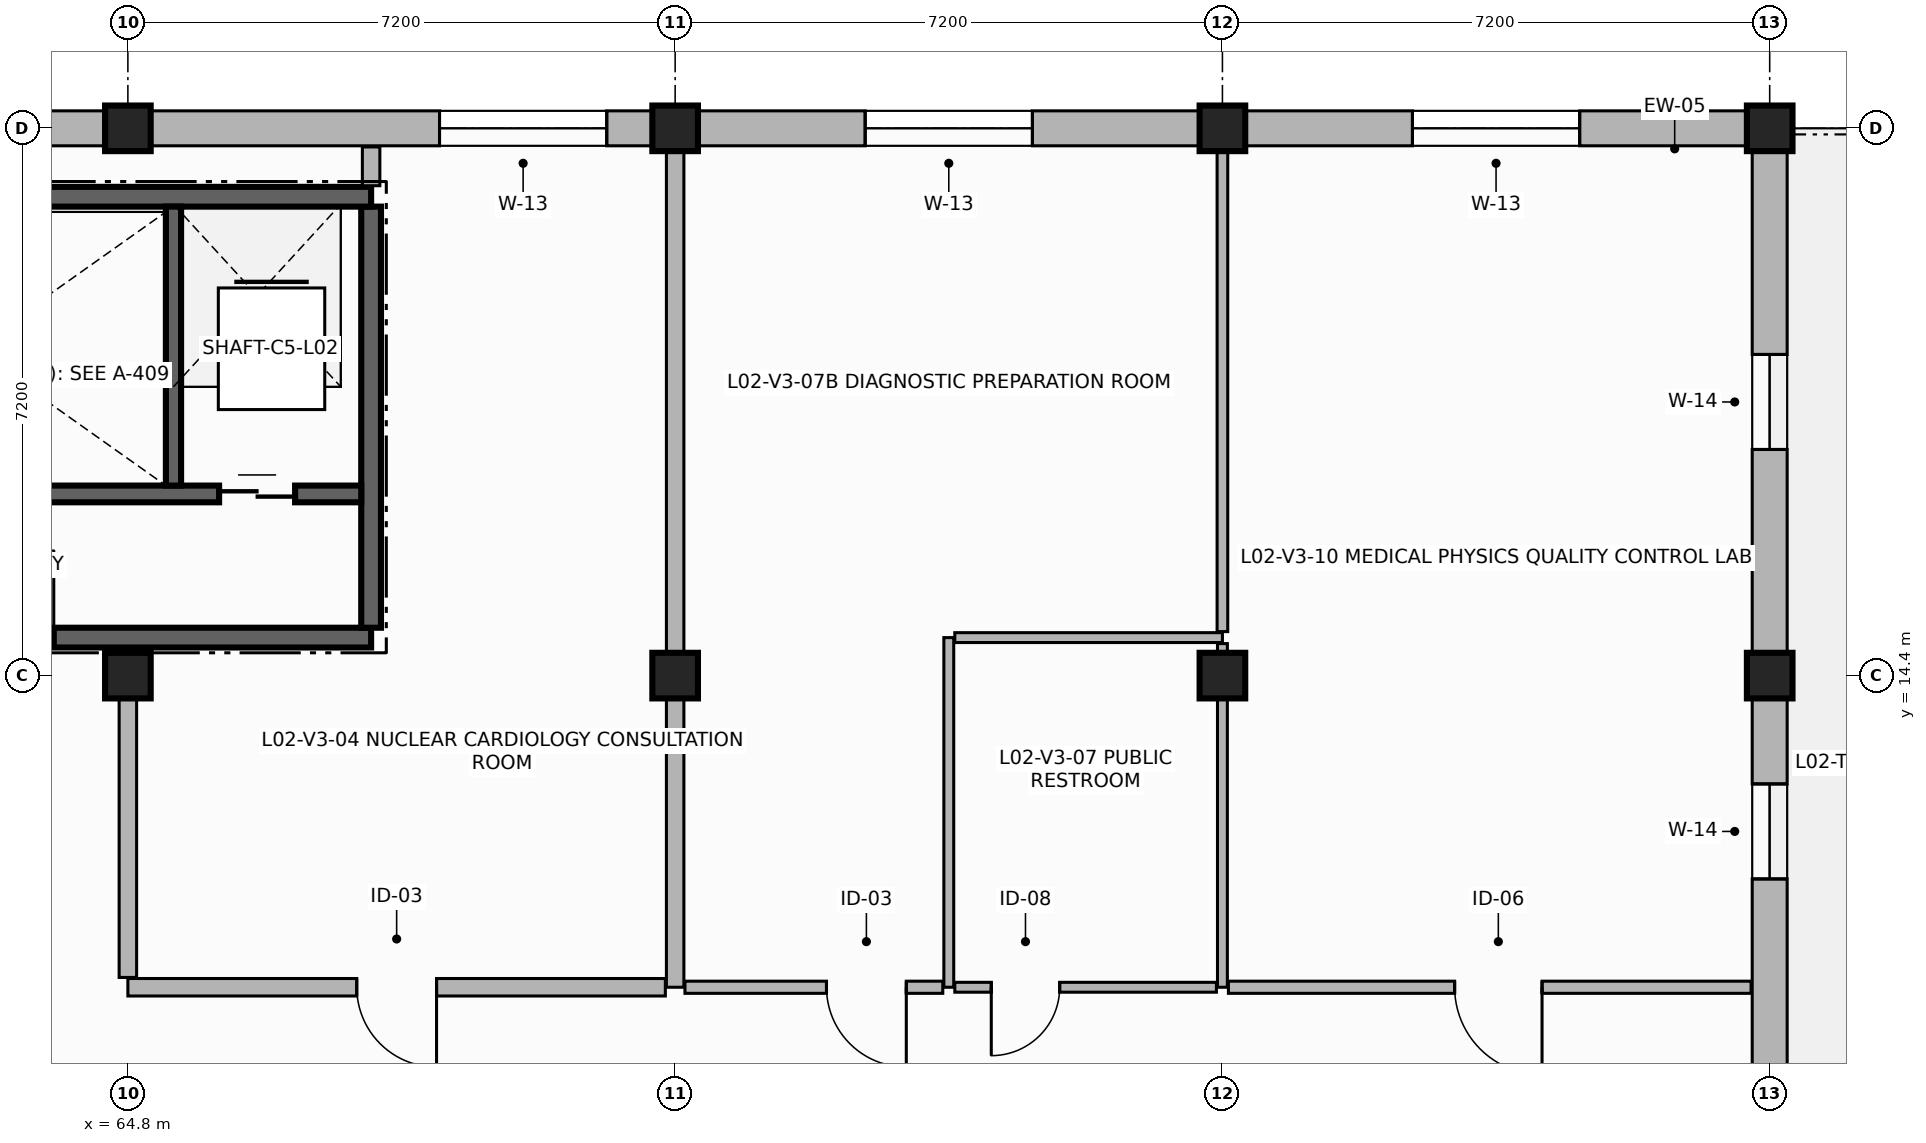
"""IFC4 building model, lengths in metres.
Left out: names, types, materials, properties, quantities, classifications, styles, units other than length and angle.
Written with IfcOpenShell. Run it as: python <this file> out.ifc"""

import sys

from ifc_helpers import new_model, si_unit, direction, frame, frame_2d, origin, origin_2d, place, context, subcontext, project, spatial, rectangle, extrude, element, fill, save


model = new_model("IFC4")
c1 = context("Model", 3, precision=1e-05, world=origin(), true_north=direction((0.0, 1.0)))
c2 = subcontext(c1, "Body", "Model", "MODEL_VIEW")
j1 = project(units=[si_unit("LENGTHUNIT", "METRE"), si_unit("PLANEANGLEUNIT", "RADIAN")], contexts=[c1])
p1 = place(None, origin())
s1 = spatial("IfcSite", under=j1, at=p1, CompositionType="ELEMENT")
p2 = place(p1, origin())
s2 = spatial("IfcBuilding", under=s1, at=p2, CompositionType="ELEMENT")
p3 = place(p2, frame((0.0, 0.0, 8.4)))
s3 = spatial("IfcBuildingStorey", under=s2, at=p3, CompositionType="ELEMENT", Elevation=8.4)
for number, where, z_axis, x_axis in (
    (1, (64.8, 14.4, 0.0), (0.0, 0.0, 1.0), (1.0, 0.0, 0.0)),
    (2, (64.8, 21.6, 0.0), (0.0, 0.0, 1.0), (1.0, 0.0, 0.0)),
    (3, (72.0, 14.4, 0.0), (0.0, 0.0, 1.0), (1.0, 0.0, 0.0)),
    (4, (72.0, 21.6, 0.0), (0.0, 0.0, 1.0), (1.0, 0.0, 0.0)),
    (5, (79.2, 14.4, 0.0), (0.0, 0.0, 1.0), (1.0, 0.0, 0.0)),
    (6, (79.2, 21.6, 0.0), (0.0, 0.0, 1.0), (1.0, 0.0, 0.0)),
    (7, (86.4, 14.4, 0.0), (0.0, 0.0, 1.0), (1.0, 0.0, 0.0)),
    (8, (86.4, 21.6, 0.0), (0.0, 0.0, 1.0), (1.0, 0.0, 0.0)),
):
    element("IfcColumn", number, at=place(p3, frame(where, z_axis=z_axis, x_axis=x_axis)), inside=s3, PredefinedType="COLUMN", context=c2, shape_type="SweptSolid", body=[
        extrude(rectangle(XDim=0.6, YDim=0.6, at=origin_2d()), origin(), (0.0, 0.0, 1.0), 3.9),
    ])
p4 = place(p3, frame((86.4, 7.2, 0.0), z_axis=(0.0, 0.0, 1.0), x_axis=(0.0, 1.0, 0.0)))
e9 = element("IfcWall", 9, at=p4, inside=s3, PredefinedType="SOLIDWALL", context=c2, shape_type="SweptSolid", body=[
    extrude(rectangle(XDim=7.2, YDim=0.46, at=frame_2d((3.6, 0.0))), origin(), (0.0, 0.0, 1.0), 3.3),
])
p5 = place(p4, frame((4.525, 0.0, 1.2)))
e10 = element("IfcOpeningElement", 10, at=p5, cuts=e9, PredefinedType="OPENING", context=c2, shape_type="SweptSolid", body=[
    extrude(rectangle(XDim=1.25, YDim=1.35, at=frame_2d((0.625, 0.675))), frame((0.0, 0.24, 0.0), z_axis=(0.0, -1.0, 0.0), x_axis=(1.0, 0.0, 0.0)), (0.0, 0.0, 1.0), 0.48),
])
p6 = place(p3, frame((86.4, 14.4, 0.0), z_axis=(0.0, 0.0, 1.0), x_axis=(0.0, 1.0, 0.0)))
e11 = element("IfcWall", 11, at=p6, inside=s3, PredefinedType="SOLIDWALL", context=c2, shape_type="SweptSolid", body=[
    extrude(rectangle(XDim=7.2, YDim=0.46, at=frame_2d((3.6, 0.0))), origin(), (0.0, 0.0, 1.0), 3.3),
])
p7 = place(p6, frame((2.975, 0.0, 1.2)))
e12 = element("IfcOpeningElement", 12, at=p7, cuts=e11, PredefinedType="OPENING", context=c2, shape_type="SweptSolid", body=[
    extrude(rectangle(XDim=1.25, YDim=1.35, at=frame_2d((0.625, 0.675))), frame((0.0, 0.24, 0.0), z_axis=(0.0, -1.0, 0.0), x_axis=(1.0, 0.0, 0.0)), (0.0, 0.0, 1.0), 0.48),
])
p8 = place(p3, frame((86.4, 21.6, 0.0), z_axis=(0.0, 0.0, 1.0), x_axis=(-1.0, 0.0, 0.0)))
e13 = element("IfcWall", 13, at=p8, inside=s3, PredefinedType="SOLIDWALL", context=c2, shape_type="SweptSolid", body=[
    extrude(rectangle(XDim=7.2, YDim=0.46, at=frame_2d((3.6, 0.0))), origin(), (0.0, 0.0, 1.0), 3.3),
])
p9 = place(p8, frame((2.5, 0.0, 1.2)))
e14 = element("IfcOpeningElement", 14, at=p9, cuts=e13, PredefinedType="OPENING", context=c2, shape_type="SweptSolid", body=[
    extrude(rectangle(XDim=2.2, YDim=1.1, at=frame_2d((1.1, 0.55))), frame((0.0, 0.24, 0.0), z_axis=(0.0, -1.0, 0.0), x_axis=(1.0, 0.0, 0.0)), (0.0, 0.0, 1.0), 0.48),
])
p10 = place(p3, frame((79.2, 21.6, 0.0), z_axis=(0.0, 0.0, 1.0), x_axis=(-1.0, 0.0, 0.0)))
e15 = element("IfcWall", 15, at=p10, inside=s3, PredefinedType="SOLIDWALL", context=c2, shape_type="SweptSolid", body=[
    extrude(rectangle(XDim=7.2, YDim=0.46, at=frame_2d((3.6, 0.0))), origin(), (0.0, 0.0, 1.0), 3.3),
])
p11 = place(p10, frame((2.5, 0.0, 1.2)))
e16 = element("IfcOpeningElement", 16, at=p11, cuts=e15, PredefinedType="OPENING", context=c2, shape_type="SweptSolid", body=[
    extrude(rectangle(XDim=2.2, YDim=1.1, at=frame_2d((1.1, 0.55))), frame((0.0, 0.24, 0.0), z_axis=(0.0, -1.0, 0.0), x_axis=(1.0, 0.0, 0.0)), (0.0, 0.0, 1.0), 0.48),
])
p12 = place(p3, frame((72.0, 21.6, 0.0), z_axis=(0.0, 0.0, 1.0), x_axis=(-1.0, 0.0, 0.0)))
e17 = element("IfcWall", 17, at=p12, inside=s3, PredefinedType="SOLIDWALL", context=c2, shape_type="SweptSolid", body=[
    extrude(rectangle(XDim=7.2, YDim=0.46, at=frame_2d((3.6, 0.0))), origin(), (0.0, 0.0, 1.0), 3.3),
])
p13 = place(p12, frame((0.9, 0.0, 1.2)))
e18 = element("IfcOpeningElement", 18, at=p13, cuts=e17, PredefinedType="OPENING", context=c2, shape_type="SweptSolid", body=[
    extrude(rectangle(XDim=2.2, YDim=1.1, at=frame_2d((1.1, 0.55))), frame((0.0, 0.24, 0.0), z_axis=(0.0, -1.0, 0.0), x_axis=(1.0, 0.0, 0.0)), (0.0, 0.0, 1.0), 0.48),
])
p14 = place(p3, frame((64.8, 21.6, 0.0), z_axis=(0.0, 0.0, 1.0), x_axis=(-1.0, 0.0, 0.0)))
e19 = element("IfcWall", 19, at=p14, inside=s3, PredefinedType="SOLIDWALL", context=c2, shape_type="SweptSolid", body=[
    extrude(rectangle(XDim=7.2, YDim=0.46, at=frame_2d((3.6, 0.0))), origin(), (0.0, 0.0, 1.0), 3.3),
])
p15 = place(p14, frame((2.5, 0.0, 1.2)))
e20 = element("IfcOpeningElement", 20, at=p15, cuts=e19, PredefinedType="OPENING", context=c2, shape_type="SweptSolid", body=[
    extrude(rectangle(XDim=2.2, YDim=1.1, at=frame_2d((1.1, 0.55))), frame((0.0, 0.24, 0.0), z_axis=(0.0, -1.0, 0.0), x_axis=(1.0, 0.0, 0.0)), (0.0, 0.0, 1.0), 0.48),
])
p16 = place(p3, frame((58.5, 14.9, 0.0), z_axis=(0.0, 0.0, 1.0), x_axis=(1.0, 0.0, 0.0)))
e21 = element("IfcWall", 21, at=p16, inside=s3, PredefinedType="SHEAR", context=c2, shape_type="SweptSolid", body=[
    extrude(rectangle(XDim=9.5, YDim=0.26, at=frame_2d((4.75, 0.0))), origin(), (0.0, 0.0, 1.0), 3.72),
])
p17 = place(p16, frame((4.175, 0.0, 0.0)))
e22 = element("IfcOpeningElement", 22, at=p17, cuts=e21, PredefinedType="OPENING", context=c2, shape_type="SweptSolid", body=[
    extrude(rectangle(XDim=1.15, YDim=2.2, at=frame_2d((0.575, 1.1))), frame((0.0, 0.14, 0.0), z_axis=(0.0, -1.0, 0.0), x_axis=(1.0, 0.0, 0.0)), (0.0, 0.0, 1.0), 0.28),
])
p18 = place(p3, frame((68.0, 15.03, 0.0), z_axis=(0.0, 0.0, 1.0), x_axis=(0.0, 1.0, 0.0)))
e23 = element("IfcWall", 23, at=p18, inside=s3, PredefinedType="SHEAR", context=c2, shape_type="SweptSolid", body=[
    extrude(rectangle(XDim=5.54, YDim=0.26, at=frame_2d((2.77, 0.0))), origin(), (0.0, 0.0, 1.0), 3.72),
])
p19 = place(p3, frame((68.0, 20.7, 0.0), z_axis=(0.0, 0.0, 1.0), x_axis=(-1.0, 0.0, 0.0)))
e24 = element("IfcWall", 24, at=p19, inside=s3, PredefinedType="SHEAR", context=c2, shape_type="SweptSolid", body=[
    extrude(rectangle(XDim=9.5, YDim=0.26, at=frame_2d((4.75, 0.0))), origin(), (0.0, 0.0, 1.0), 3.72),
])
p20 = place(p3, frame((58.63, 16.79, 0.0), z_axis=(0.0, 0.0, 1.0), x_axis=(1.0, 0.0, 0.0)))
e25 = element("IfcWall", 25, at=p20, inside=s3, PredefinedType="SHEAR", context=c2, shape_type="SweptSolid", body=[
    extrude(rectangle(XDim=9.24, YDim=0.22, at=frame_2d((4.62, 0.0))), origin(), (0.0, 0.0, 1.0), 3.72),
])
p21 = place(p20, frame((0.32, 0.0, 0.0)))
e26 = element("IfcOpeningElement", 26, at=p21, cuts=e25, PredefinedType="OPENING", context=c2, shape_type="SweptSolid", body=[
    extrude(rectangle(XDim=1.1, YDim=2.15, at=frame_2d((0.55, 1.075))), frame((0.0, 0.12, 0.0), z_axis=(0.0, -1.0, 0.0), x_axis=(1.0, 0.0, 0.0)), (0.0, 0.0, 1.0), 0.24),
])
p22 = place(p20, frame((7.37, 0.0, 0.0)))
e27 = element("IfcOpeningElement", 27, at=p22, cuts=e25, PredefinedType="OPENING", context=c2, shape_type="SweptSolid", body=[
    extrude(rectangle(XDim=1.0, YDim=2.2, at=frame_2d((0.5, 1.1))), frame((0.0, 0.12, 0.0), z_axis=(0.0, -1.0, 0.0), x_axis=(1.0, 0.0, 0.0)), (0.0, 0.0, 1.0), 0.24),
])
p23 = place(p3, frame((65.4, 16.9, 0.0), z_axis=(0.0, 0.0, 1.0), x_axis=(0.0, 1.0, 0.0)))
e28 = element("IfcWall", 28, at=p23, inside=s3, PredefinedType="SHEAR", context=c2, shape_type="SweptSolid", body=[
    extrude(rectangle(XDim=3.67, YDim=0.2, at=frame_2d((1.835, 0.0))), origin(), (0.0, 0.0, 1.0), 3.72),
])
p24 = place(p3, frame((72.0, 21.355, 0.0), z_axis=(0.0, 0.0, 1.0), x_axis=(0.0, -1.0, 0.0)))
e29 = element("IfcWall", 29, at=p24, inside=s3, PredefinedType="PARTITIONING", context=c2, shape_type="SweptSolid", body=[
    extrude(rectangle(XDim=11.055, YDim=0.23, at=frame_2d((5.527, 0.0))), origin(), (0.0, 0.0, 1.0), 3.04),
])
p25 = place(p3, frame((71.871, 10.3, 0.0), z_axis=(0.0, 0.0, 1.0), x_axis=(-1.0, 0.0, 0.0)))
e30 = element("IfcWall", 30, at=p25, inside=s3, PredefinedType="PARTITIONING", context=c2, shape_type="SweptSolid", body=[
    extrude(rectangle(XDim=7.071, YDim=0.23, at=frame_2d((3.536, 0.0))), origin(), (0.0, 0.0, 1.0), 3.04),
])
p26 = place(p25, frame((3.01, 0.0, 0.0)))
e31 = element("IfcOpeningElement", 31, at=p26, cuts=e30, PredefinedType="OPENING", context=c2, shape_type="SweptSolid", body=[
    extrude(rectangle(XDim=1.05, YDim=2.15, at=frame_2d((0.525, 1.075))), frame((0.0, 0.125, 0.0), z_axis=(0.0, -1.0, 0.0), x_axis=(1.0, 0.0, 0.0)), (0.0, 0.0, 1.0), 0.25),
])
p27 = place(p3, frame((64.8, 10.429, 0.0), z_axis=(0.0, 0.0, 1.0), x_axis=(0.0, 1.0, 0.0)))
e32 = element("IfcWall", 32, at=p27, inside=s3, PredefinedType="PARTITIONING", context=c2, shape_type="SweptSolid", body=[
    extrude(rectangle(XDim=4.326, YDim=0.23, at=frame_2d((2.163, 0.0))), origin(), (0.0, 0.0, 1.0), 3.04),
])
p28 = place(p3, frame((68.0, 20.845, 0.0), z_axis=(0.0, 0.0, 1.0), x_axis=(0.0, 1.0, 0.0)))
e33 = element("IfcWall", 33, at=p28, inside=s3, PredefinedType="PARTITIONING", context=c2, shape_type="SweptSolid", body=[
    extrude(rectangle(XDim=0.51, YDim=0.23, at=frame_2d((0.255, 0.0))), origin(), (0.0, 0.0, 1.0), 3.04),
])
p29 = place(p3, frame((75.6, 10.3, 0.0), z_axis=(0.0, 0.0, 1.0), x_axis=(0.0, 1.0, 0.0)))
e34 = element("IfcWall", 34, at=p29, inside=s3, PredefinedType="PARTITIONING", context=c2, shape_type="SweptSolid", body=[
    extrude(rectangle(XDim=4.6, YDim=0.13, at=frame_2d((2.3, 0.0))), origin(), (0.0, 0.0, 1.0), 3.04),
])
p30 = place(p3, frame((75.679, 14.9, 0.0), z_axis=(0.0, 0.0, 1.0), x_axis=(1.0, 0.0, 0.0)))
e35 = element("IfcWall", 35, at=p30, inside=s3, PredefinedType="PARTITIONING", context=c2, shape_type="SweptSolid", body=[
    extrude(rectangle(XDim=3.521, YDim=0.13, at=frame_2d((1.76, 0.0))), origin(), (0.0, 0.0, 1.0), 3.04),
])
p31 = place(p3, frame((79.2, 14.821, 0.0), z_axis=(0.0, 0.0, 1.0), x_axis=(0.0, -1.0, 0.0)))
e36 = element("IfcWall", 36, at=p31, inside=s3, PredefinedType="PARTITIONING", context=c2, shape_type="SweptSolid", body=[
    extrude(rectangle(XDim=4.521, YDim=0.13, at=frame_2d((2.26, 0.0))), origin(), (0.0, 0.0, 1.0), 3.04),
])
p32 = place(p3, frame((79.121, 10.3, 0.0), z_axis=(0.0, 0.0, 1.0), x_axis=(-1.0, 0.0, 0.0)))
e37 = element("IfcWall", 37, at=p32, inside=s3, PredefinedType="PARTITIONING", context=c2, shape_type="SweptSolid", body=[
    extrude(rectangle(XDim=3.442, YDim=0.13, at=frame_2d((1.721, 0.0))), origin(), (0.0, 0.0, 1.0), 3.04),
])
p33 = place(p32, frame((2.062, 0.0, 0.0)))
e38 = element("IfcOpeningElement", 38, at=p33, cuts=e37, PredefinedType="OPENING", context=c2, shape_type="SweptSolid", body=[
    extrude(rectangle(XDim=0.9, YDim=2.1, at=frame_2d((0.45, 1.05))), frame((0.0, 0.075, 0.0), z_axis=(0.0, -1.0, 0.0), x_axis=(1.0, 0.0, 0.0)), (0.0, 0.0, 1.0), 0.15),
])
p34 = place(p3, frame((75.521, 10.3, 0.0), z_axis=(0.0, 0.0, 1.0), x_axis=(-1.0, 0.0, 0.0)))
e39 = element("IfcWall", 39, at=p34, inside=s3, PredefinedType="PARTITIONING", context=c2, shape_type="SweptSolid", body=[
    extrude(rectangle(XDim=3.392, YDim=0.16, at=frame_2d((1.696, 0.0))), origin(), (0.0, 0.0, 1.0), 3.04),
])
p35 = place(p34, frame((0.48, 0.0, 0.0)))
e40 = element("IfcOpeningElement", 40, at=p35, cuts=e39, PredefinedType="OPENING", context=c2, shape_type="SweptSolid", body=[
    extrude(rectangle(XDim=1.05, YDim=2.15, at=frame_2d((0.525, 1.075))), frame((0.0, 0.09, 0.0), z_axis=(0.0, -1.0, 0.0), x_axis=(1.0, 0.0, 0.0)), (0.0, 0.0, 1.0), 0.18),
])
p36 = place(p3, frame((79.2, 21.355, 0.0), z_axis=(0.0, 0.0, 1.0), x_axis=(0.0, -1.0, 0.0)))
e41 = element("IfcWall", 41, at=p36, inside=s3, PredefinedType="PARTITIONING", context=c2, shape_type="SweptSolid", body=[
    extrude(rectangle(XDim=6.376, YDim=0.14, at=frame_2d((3.188, 0.0))), origin(), (0.0, 0.0, 1.0), 3.04),
])
p37 = place(p3, frame((86.155, 10.3, 0.0), z_axis=(0.0, 0.0, 1.0), x_axis=(-1.0, 0.0, 0.0)))
e42 = element("IfcWall", 42, at=p37, inside=s3, PredefinedType="PARTITIONING", context=c2, shape_type="SweptSolid", body=[
    extrude(rectangle(XDim=6.876, YDim=0.16, at=frame_2d((3.438, 0.0))), origin(), (0.0, 0.0, 1.0), 3.04),
])
p38 = place(p37, frame((2.75, 0.0, 0.0)))
e43 = element("IfcOpeningElement", 43, at=p38, cuts=e42, PredefinedType="OPENING", context=c2, shape_type="SweptSolid", body=[
    extrude(rectangle(XDim=1.15, YDim=2.25, at=frame_2d((0.575, 1.125))), frame((0.0, 0.09, 0.0), z_axis=(0.0, -1.0, 0.0), x_axis=(1.0, 0.0, 0.0)), (0.0, 0.0, 1.0), 0.18),
])
p39 = place(p5, origin())
e44 = element("IfcWindow", 44, at=p39, inside=s3, PartitioningType="SINGLE_PANEL", PredefinedType="WINDOW", context=c2, shape_type="SweptSolid", body=[
    extrude(rectangle(XDim=1.25, YDim=1.35, at=frame_2d((0.625, 0.675))), frame((0.0, 0.03, 0.0), z_axis=(0.0, -1.0, 0.0), x_axis=(1.0, 0.0, 0.0)), (0.0, 0.0, 1.0), 0.06),
])
fill(e10, e44)
p40 = place(p7, origin())
e45 = element("IfcWindow", 45, at=p40, inside=s3, PartitioningType="SINGLE_PANEL", PredefinedType="WINDOW", context=c2, shape_type="SweptSolid", body=[
    extrude(rectangle(XDim=1.25, YDim=1.35, at=frame_2d((0.625, 0.675))), frame((0.0, 0.03, 0.0), z_axis=(0.0, -1.0, 0.0), x_axis=(1.0, 0.0, 0.0)), (0.0, 0.0, 1.0), 0.06),
])
fill(e12, e45)
p41 = place(p9, origin())
e46 = element("IfcWindow", 46, at=p41, inside=s3, PartitioningType="SINGLE_PANEL", PredefinedType="WINDOW", context=c2, shape_type="SweptSolid", body=[
    extrude(rectangle(XDim=2.2, YDim=1.1, at=frame_2d((1.1, 0.55))), frame((0.0, 0.03, 0.0), z_axis=(0.0, -1.0, 0.0), x_axis=(1.0, 0.0, 0.0)), (0.0, 0.0, 1.0), 0.06),
])
fill(e14, e46)
p42 = place(p11, origin())
e47 = element("IfcWindow", 47, at=p42, inside=s3, PartitioningType="SINGLE_PANEL", PredefinedType="WINDOW", context=c2, shape_type="SweptSolid", body=[
    extrude(rectangle(XDim=2.2, YDim=1.1, at=frame_2d((1.1, 0.55))), frame((0.0, 0.03, 0.0), z_axis=(0.0, -1.0, 0.0), x_axis=(1.0, 0.0, 0.0)), (0.0, 0.0, 1.0), 0.06),
])
fill(e16, e47)
p43 = place(p13, origin())
e48 = element("IfcWindow", 48, at=p43, inside=s3, PartitioningType="SINGLE_PANEL", PredefinedType="WINDOW", context=c2, shape_type="SweptSolid", body=[
    extrude(rectangle(XDim=2.2, YDim=1.1, at=frame_2d((1.1, 0.55))), frame((0.0, 0.03, 0.0), z_axis=(0.0, -1.0, 0.0), x_axis=(1.0, 0.0, 0.0)), (0.0, 0.0, 1.0), 0.06),
])
fill(e18, e48)
p44 = place(p22, origin())
e49 = element("IfcDoor", 49, at=p44, inside=s3, OperationType="DOUBLE_DOOR_SLIDING", PredefinedType="DOOR", context=c2, shape_type="SweptSolid", body=[
    extrude(rectangle(XDim=1.0, YDim=2.2, at=frame_2d((0.5, 1.1))), frame((0.0, 0.025, 0.0), z_axis=(0.0, -1.0, 0.0), x_axis=(1.0, 0.0, 0.0)), (0.0, 0.0, 1.0), 0.05),
])
fill(e27, e49)
p45 = place(p17, origin())
e50 = element("IfcDoor", 50, at=p45, inside=s3, OperationType="SINGLE_SWING_RIGHT", PredefinedType="DOOR", context=c2, shape_type="SweptSolid", body=[
    extrude(rectangle(XDim=1.15, YDim=2.2, at=frame_2d((0.575, 1.1))), frame((0.0, 0.025, 0.0), z_axis=(0.0, -1.0, 0.0), x_axis=(1.0, 0.0, 0.0)), (0.0, 0.0, 1.0), 0.05),
])
fill(e22, e50)
p46 = place(p26, origin())
e51 = element("IfcDoor", 51, at=p46, inside=s3, OperationType="SINGLE_SWING_LEFT", PredefinedType="DOOR", context=c2, shape_type="SweptSolid", body=[
    extrude(rectangle(XDim=1.05, YDim=2.15, at=frame_2d((0.525, 1.075))), frame((0.0, 0.025, 0.0), z_axis=(0.0, -1.0, 0.0), x_axis=(1.0, 0.0, 0.0)), (0.0, 0.0, 1.0), 0.05),
])
fill(e31, e51)
p47 = place(p33, origin())
e52 = element("IfcDoor", 52, at=p47, inside=s3, OperationType="SINGLE_SWING_RIGHT", PredefinedType="DOOR", context=c2, shape_type="SweptSolid", body=[
    extrude(rectangle(XDim=0.9, YDim=2.1, at=frame_2d((0.45, 1.05))), frame((0.0, 0.025, 0.0), z_axis=(0.0, -1.0, 0.0), x_axis=(1.0, 0.0, 0.0)), (0.0, 0.0, 1.0), 0.05),
])
fill(e38, e52)
p48 = place(p35, origin())
e53 = element("IfcDoor", 53, at=p48, inside=s3, OperationType="SINGLE_SWING_LEFT", PredefinedType="DOOR", context=c2, shape_type="SweptSolid", body=[
    extrude(rectangle(XDim=1.05, YDim=2.15, at=frame_2d((0.525, 1.075))), frame((0.0, 0.025, 0.0), z_axis=(0.0, -1.0, 0.0), x_axis=(1.0, 0.0, 0.0)), (0.0, 0.0, 1.0), 0.05),
])
fill(e40, e53)
p49 = place(p38, origin())
e54 = element("IfcDoor", 54, at=p49, inside=s3, OperationType="SINGLE_SWING_LEFT", PredefinedType="DOOR", context=c2, shape_type="SweptSolid", body=[
    extrude(rectangle(XDim=1.15, YDim=2.25, at=frame_2d((0.575, 1.125))), frame((0.0, 0.025, 0.0), z_axis=(0.0, -1.0, 0.0), x_axis=(1.0, 0.0, 0.0)), (0.0, 0.0, 1.0), 0.05),
])
fill(e43, e54)
save(model, sys.argv[1])
